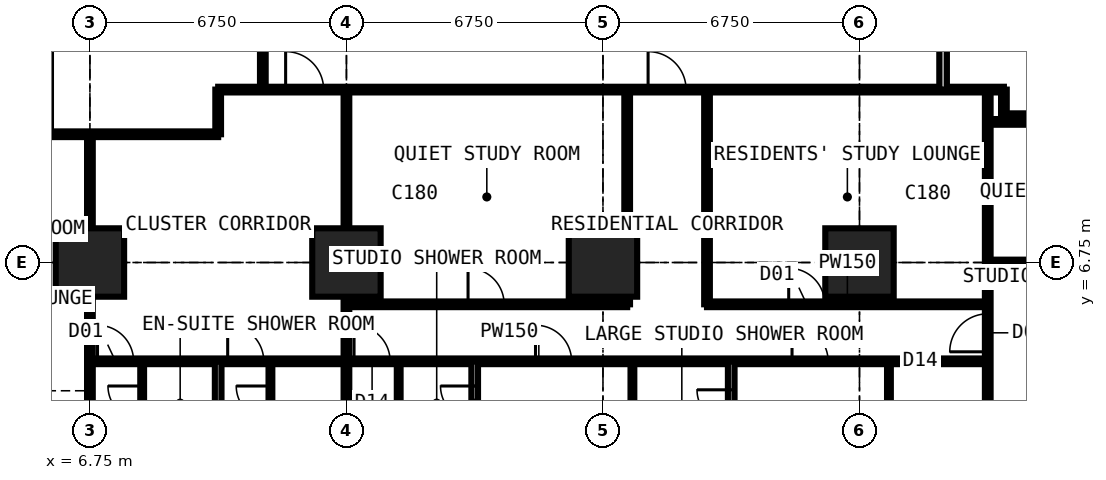
"""IFC4 building model, lengths in metres.
Left out: names, types, materials, properties, quantities, classifications, styles, units other than length and angle.
Written with IfcOpenShell. Run it as: python <this file> out.ifc"""

import sys

from ifc_helpers import new_model, si_unit, direction, frame, frame_2d, origin, origin_2d, place, context, subcontext, project, spatial, rectangle, extrude, element, fill, save


model = new_model("IFC4")
c1 = context("Model", 3, precision=1e-05, world=origin(), true_north=direction((0.0, 1.0)))
c2 = subcontext(c1, "Body", "Model", "MODEL_VIEW")
j1 = project(units=[si_unit("LENGTHUNIT", "METRE"), si_unit("PLANEANGLEUNIT", "RADIAN")], contexts=[c1])
p1 = place(None, origin())
s1 = spatial("IfcSite", under=j1, at=p1, CompositionType="ELEMENT")
p2 = place(p1, origin())
s2 = spatial("IfcBuilding", under=s1, at=p2, CompositionType="ELEMENT")
p3 = place(p2, frame((0.0, 0.0, 54.0)))
s3 = spatial("IfcBuildingStorey", under=s2, at=p3, CompositionType="ELEMENT", Elevation=54.0)
for number, where, z_axis, x_axis in (
    (1, (6.75, 6.75, 0.0), (0.0, 0.0, 1.0), (1.0, 0.0, 0.0)),
    (2, (13.5, 6.75, 0.0), (0.0, 0.0, 1.0), (1.0, 0.0, 0.0)),
    (3, (20.25, 6.75, 0.0), (0.0, 0.0, 1.0), (1.0, 0.0, 0.0)),
    (4, (27.0, 6.75, 0.0), (0.0, 0.0, 1.0), (1.0, 0.0, 0.0)),
):
    element("IfcColumn", number, at=place(p3, frame(where, z_axis=z_axis, x_axis=x_axis)), inside=s3, PredefinedType="COLUMN", context=c2, shape_type="SweptSolid", body=[
        extrude(rectangle(XDim=1.8, YDim=1.8, at=origin_2d()), origin(), (0.0, 0.0, 1.0), 3.6),
    ])
p4 = place(p3, frame((-0.734, 10.125, 0.0), z_axis=(0.0, 0.0, 1.0), x_axis=(1.0, 0.0, 0.0)))
e5 = element("IfcWall", 5, at=p4, inside=s3, PredefinedType="PARTITIONING", context=c2, shape_type="SweptSolid", body=[
    extrude(rectangle(XDim=10.859, YDim=0.15, at=frame_2d((5.429, 0.0))), origin(), (0.0, 0.0, 1.0), 3.375),
])
p5 = place(p4, frame((5.134, 0.0, 0.0)))
e6 = element("IfcOpeningElement", 6, at=p5, cuts=e5, PredefinedType="OPENING", context=c2, shape_type="SweptSolid", body=[
    extrude(rectangle(XDim=1.0, YDim=2.2, at=frame_2d((0.5, 1.1))), frame((0.0, 0.085, 0.0), z_axis=(0.0, -1.0, 0.0), x_axis=(1.0, 0.0, 0.0)), (0.0, 0.0, 1.0), 0.17),
])
p6 = place(p3, frame((6.75, -0.734, 0.0), z_axis=(0.0, 0.0, 1.0), x_axis=(0.0, 1.0, 0.0)))
e7 = element("IfcWall", 7, at=p6, inside=s3, PredefinedType="PARTITIONING", context=c2, shape_type="SweptSolid", body=[
    extrude(rectangle(XDim=10.859, YDim=0.15, at=frame_2d((5.429, 0.0))), origin(), (0.0, 0.0, 1.0), 2.877),
])
p7 = place(p3, frame((6.75, 4.15, 0.0), z_axis=(0.0, 0.0, 1.0), x_axis=(1.0, 0.0, 0.0)))
e8 = element("IfcWall", 8, at=p7, inside=s3, PredefinedType="PARTITIONING", context=c2, shape_type="SweptSolid", body=[
    extrude(rectangle(XDim=23.625, YDim=0.15, at=frame_2d((11.812, 0.0))), origin(), (0.0, 0.0, 1.0), 3.375),
])
p8 = place(p7, frame((0.2, 0.0, 0.0)))
e9 = element("IfcOpeningElement", 9, at=p8, cuts=e8, PredefinedType="OPENING", context=c2, shape_type="SweptSolid", body=[
    extrude(rectangle(XDim=0.95, YDim=2.2, at=frame_2d((0.475, 1.1))), frame((0.0, 0.085, 0.0), z_axis=(0.0, -1.0, 0.0), x_axis=(1.0, 0.0, 0.0)), (0.0, 0.0, 1.0), 0.17),
])
p9 = place(p7, frame((3.625, 0.0, 0.0)))
e10 = element("IfcOpeningElement", 10, at=p9, cuts=e8, PredefinedType="OPENING", context=c2, shape_type="SweptSolid", body=[
    extrude(rectangle(XDim=0.95, YDim=2.2, at=frame_2d((0.475, 1.1))), frame((0.0, 0.085, 0.0), z_axis=(0.0, -1.0, 0.0), x_axis=(1.0, 0.0, 0.0)), (0.0, 0.0, 1.0), 0.17),
])
p10 = place(p7, frame((18.475, 0.0, 0.0)))
e11 = element("IfcOpeningElement", 11, at=p10, cuts=e8, PredefinedType="OPENING", context=c2, shape_type="SweptSolid", body=[
    extrude(rectangle(XDim=0.95, YDim=2.2, at=frame_2d((0.475, 1.1))), frame((0.0, 0.085, 0.0), z_axis=(0.0, -1.0, 0.0), x_axis=(1.0, 0.0, 0.0)), (0.0, 0.0, 1.0), 0.17),
])
p11 = place(p7, frame((11.725, 0.0, 0.0)))
e12 = element("IfcOpeningElement", 12, at=p11, cuts=e8, PredefinedType="OPENING", context=c2, shape_type="SweptSolid", body=[
    extrude(rectangle(XDim=0.95, YDim=2.2, at=frame_2d((0.475, 1.1))), frame((0.0, 0.085, 0.0), z_axis=(0.0, -1.0, 0.0), x_axis=(1.0, 0.0, 0.0)), (0.0, 0.0, 1.0), 0.17),
])
p12 = place(p7, frame((6.95, 0.0, 0.0)))
e13 = element("IfcOpeningElement", 13, at=p12, cuts=e8, PredefinedType="OPENING", context=c2, shape_type="SweptSolid", body=[
    extrude(rectangle(XDim=0.95, YDim=2.2, at=frame_2d((0.475, 1.1))), frame((0.0, 0.085, 0.0), z_axis=(0.0, -1.0, 0.0), x_axis=(1.0, 0.0, 0.0)), (0.0, 0.0, 1.0), 0.17),
])
p13 = place(p3, frame((8.125, 1.95, 0.0), z_axis=(0.0, 0.0, 1.0), x_axis=(0.0, 1.0, 0.0)))
e14 = element("IfcWall", 14, at=p13, inside=s3, PredefinedType="PARTITIONING", context=c2, shape_type="SweptSolid", body=[
    extrude(rectangle(XDim=2.2, YDim=0.1, at=frame_2d((1.1, 0.0))), origin(), (0.0, 0.0, 1.0), 3.375),
])
p14 = place(p13, frame((0.65, 0.0, 0.0)))
e15 = element("IfcOpeningElement", 15, at=p14, cuts=e14, PredefinedType="OPENING", context=c2, shape_type="SweptSolid", body=[
    extrude(rectangle(XDim=0.9, YDim=2.2, at=frame_2d((0.45, 1.1))), frame((0.0, 0.06, 0.0), z_axis=(0.0, -1.0, 0.0), x_axis=(1.0, 0.0, 0.0)), (0.0, 0.0, 1.0), 0.12),
])
p15 = place(p3, frame((10.125, -0.734, 0.0), z_axis=(0.0, 0.0, 1.0), x_axis=(0.0, 1.0, 0.0)))
e16 = element("IfcWall", 16, at=p15, inside=s3, PredefinedType="PARTITIONING", context=c2, shape_type="SweptSolid", body=[
    extrude(rectangle(XDim=4.884, YDim=0.175, at=frame_2d((2.442, 0.0))), origin(), (0.0, 0.0, 1.0), 3.375),
])
p16 = place(p3, frame((10.125, 10.125, 0.0), z_axis=(0.0, 0.0, 1.0), x_axis=(0.0, 1.0, 0.0)))
e17 = element("IfcWall", 17, at=p16, inside=s3, PredefinedType="PARTITIONING", context=c2, shape_type="SweptSolid", body=[
    extrude(rectangle(XDim=1.175, YDim=0.15, at=frame_2d((0.587, 0.0))), origin(), (0.0, 0.0, 1.0), 3.375),
])
p17 = place(p3, frame((10.125, 11.3, 0.0), z_axis=(0.0, 0.0, 1.0), x_axis=(1.0, 0.0, 0.0)))
e18 = element("IfcWall", 18, at=p17, inside=s3, PredefinedType="PARTITIONING", context=c2, shape_type="SweptSolid", body=[
    extrude(rectangle(XDim=20.675, YDim=0.15, at=frame_2d((10.337, 0.0))), origin(), (0.0, 0.0, 1.0), 3.375),
])
p18 = place(p17, frame((1.775, 0.0, 0.0)))
e19 = element("IfcOpeningElement", 19, at=p18, cuts=e18, PredefinedType="OPENING", context=c2, shape_type="SweptSolid", body=[
    extrude(rectangle(XDim=1.0, YDim=2.2, at=frame_2d((0.5, 1.1))), frame((0.0, 0.085, 0.0), z_axis=(0.0, -1.0, 0.0), x_axis=(1.0, 0.0, 0.0)), (0.0, 0.0, 1.0), 0.17),
])
p19 = place(p17, frame((11.312, 0.0, 0.0)))
e20 = element("IfcOpeningElement", 20, at=p19, cuts=e18, PredefinedType="OPENING", context=c2, shape_type="SweptSolid", body=[
    extrude(rectangle(XDim=1.0, YDim=2.2, at=frame_2d((0.5, 1.1))), frame((0.0, 0.085, 0.0), z_axis=(0.0, -1.0, 0.0), x_axis=(1.0, 0.0, 0.0)), (0.0, 0.0, 1.0), 0.17),
])
p20 = place(p3, frame((11.3, 11.3, 0.0), z_axis=(0.0, 0.0, 1.0), x_axis=(0.0, 1.0, 0.0)))
e21 = element("IfcWall", 21, at=p20, inside=s3, PredefinedType="PARTITIONING", context=c2, shape_type="SweptSolid", body=[
    extrude(rectangle(XDim=19.075, YDim=0.15, at=frame_2d((9.538, 0.0))), origin(), (0.0, 0.0, 1.0), 3.375),
])
p21 = place(p20, frame((10.137, 0.0, 0.0)))
e22 = element("IfcOpeningElement", 22, at=p21, cuts=e21, PredefinedType="OPENING", context=c2, shape_type="SweptSolid", body=[
    extrude(rectangle(XDim=1.0, YDim=2.2, at=frame_2d((0.5, 1.1))), frame((0.0, 0.085, 0.0), z_axis=(0.0, -1.0, 0.0), x_axis=(1.0, 0.0, 0.0)), (0.0, 0.0, 1.0), 0.17),
])
p22 = place(p3, frame((11.5, 1.95, 0.0), z_axis=(0.0, 0.0, 1.0), x_axis=(0.0, 1.0, 0.0)))
e23 = element("IfcWall", 23, at=p22, inside=s3, PredefinedType="PARTITIONING", context=c2, shape_type="SweptSolid", body=[
    extrude(rectangle(XDim=2.2, YDim=0.1, at=frame_2d((1.1, 0.0))), origin(), (0.0, 0.0, 1.0), 3.375),
])
p23 = place(p22, frame((0.65, 0.0, 0.0)))
e24 = element("IfcOpeningElement", 24, at=p23, cuts=e23, PredefinedType="OPENING", context=c2, shape_type="SweptSolid", body=[
    extrude(rectangle(XDim=0.9, YDim=2.2, at=frame_2d((0.45, 1.1))), frame((0.0, 0.06, 0.0), z_axis=(0.0, -1.0, 0.0), x_axis=(1.0, 0.0, 0.0)), (0.0, 0.0, 1.0), 0.12),
])
p24 = place(p3, frame((13.5, -0.734, 0.0), z_axis=(0.0, 0.0, 1.0), x_axis=(0.0, 1.0, 0.0)))
e25 = element("IfcWall", 25, at=p24, inside=s3, PredefinedType="PARTITIONING", context=c2, shape_type="SweptSolid", body=[
    extrude(rectangle(XDim=12.034, YDim=0.15, at=frame_2d((6.017, 0.0))), origin(), (0.0, 0.0, 1.0), 2.877),
])
p25 = place(p3, frame((13.5, 5.65, 0.0), z_axis=(0.0, 0.0, 1.0), x_axis=(1.0, 0.0, 0.0)))
e26 = element("IfcWall", 26, at=p25, inside=s3, PredefinedType="PARTITIONING", context=c2, shape_type="SweptSolid", body=[
    extrude(rectangle(XDim=7.387, YDim=0.15, at=frame_2d((3.694, 0.0))), origin(), (0.0, 0.0, 1.0), 3.375),
])
p26 = place(p25, frame((3.2, 0.0, 0.0)))
e27 = element("IfcOpeningElement", 27, at=p26, cuts=e26, PredefinedType="OPENING", context=c2, shape_type="SweptSolid", body=[
    extrude(rectangle(XDim=0.95, YDim=2.2, at=frame_2d((0.475, 1.1))), frame((0.0, 0.085, 0.0), z_axis=(0.0, -1.0, 0.0), x_axis=(1.0, 0.0, 0.0)), (0.0, 0.0, 1.0), 0.17),
])
p27 = place(p3, frame((14.875, 1.95, 0.0), z_axis=(0.0, 0.0, 1.0), x_axis=(0.0, 1.0, 0.0)))
e28 = element("IfcWall", 28, at=p27, inside=s3, PredefinedType="PARTITIONING", context=c2, shape_type="SweptSolid", body=[
    extrude(rectangle(XDim=2.2, YDim=0.1, at=frame_2d((1.1, 0.0))), origin(), (0.0, 0.0, 1.0), 3.375),
])
p28 = place(p3, frame((16.875, -0.734, 0.0), z_axis=(0.0, 0.0, 1.0), x_axis=(0.0, 1.0, 0.0)))
e29 = element("IfcWall", 29, at=p28, inside=s3, PredefinedType="PARTITIONING", context=c2, shape_type="SweptSolid", body=[
    extrude(rectangle(XDim=4.884, YDim=0.175, at=frame_2d((2.442, 0.0))), origin(), (0.0, 0.0, 1.0), 3.375),
])
p29 = place(p28, frame((3.334, 0.0, 0.0)))
e30 = element("IfcOpeningElement", 30, at=p29, cuts=e29, PredefinedType="OPENING", context=c2, shape_type="SweptSolid", body=[
    extrude(rectangle(XDim=0.9, YDim=2.2, at=frame_2d((0.45, 1.1))), frame((0.0, 0.097, 0.0), z_axis=(0.0, -1.0, 0.0), x_axis=(1.0, 0.0, 0.0)), (0.0, 0.0, 1.0), 0.195),
])
p30 = place(p3, frame((20.887, 5.65, 0.0), z_axis=(0.0, 0.0, 1.0), x_axis=(0.0, 1.0, 0.0)))
e31 = element("IfcWall", 31, at=p30, inside=s3, PredefinedType="PARTITIONING", context=c2, shape_type="SweptSolid", body=[
    extrude(rectangle(XDim=5.65, YDim=0.15, at=frame_2d((2.825, 0.0))), origin(), (0.0, 0.0, 1.0), 3.375),
])
p31 = place(p3, frame((21.025, 1.75, 0.0), z_axis=(0.0, 0.0, 1.0), x_axis=(0.0, 1.0, 0.0)))
e32 = element("IfcWall", 32, at=p31, inside=s3, PredefinedType="PARTITIONING", context=c2, shape_type="SweptSolid", body=[
    extrude(rectangle(XDim=2.4, YDim=0.1, at=frame_2d((1.2, 0.0))), origin(), (0.0, 0.0, 1.0), 3.375),
])
p32 = place(p3, frame((22.988, 5.65, 0.0), z_axis=(0.0, 0.0, 1.0), x_axis=(1.0, 0.0, 0.0)))
e33 = element("IfcWall", 33, at=p32, inside=s3, PredefinedType="PARTITIONING", context=c2, shape_type="SweptSolid", body=[
    extrude(rectangle(XDim=7.387, YDim=0.15, at=frame_2d((3.694, 0.0))), origin(), (0.0, 0.0, 1.0), 3.375),
])
p33 = place(p32, frame((2.15, 0.0, 0.0)))
e34 = element("IfcOpeningElement", 34, at=p33, cuts=e33, PredefinedType="OPENING", context=c2, shape_type="SweptSolid", body=[
    extrude(rectangle(XDim=0.95, YDim=2.2, at=frame_2d((0.475, 1.1))), frame((0.0, 0.085, 0.0), z_axis=(0.0, -1.0, 0.0), x_axis=(1.0, 0.0, 0.0)), (0.0, 0.0, 1.0), 0.17),
])
p34 = place(p3, frame((22.988, 5.65, 0.0), z_axis=(0.0, 0.0, 1.0), x_axis=(0.0, 1.0, 0.0)))
e35 = element("IfcWall", 35, at=p34, inside=s3, PredefinedType="PARTITIONING", context=c2, shape_type="SweptSolid", body=[
    extrude(rectangle(XDim=5.65, YDim=0.15, at=frame_2d((2.825, 0.0))), origin(), (0.0, 0.0, 1.0), 3.375),
])
p35 = place(p3, frame((23.625, -0.734, 0.0), z_axis=(0.0, 0.0, 1.0), x_axis=(0.0, 1.0, 0.0)))
e36 = element("IfcWall", 36, at=p35, inside=s3, PredefinedType="PARTITIONING", context=c2, shape_type="SweptSolid", body=[
    extrude(rectangle(XDim=4.884, YDim=0.175, at=frame_2d((2.442, 0.0))), origin(), (0.0, 0.0, 1.0), 3.375),
])
p36 = place(p35, frame((3.234, 0.0, 0.0)))
e37 = element("IfcOpeningElement", 37, at=p36, cuts=e36, PredefinedType="OPENING", context=c2, shape_type="SweptSolid", body=[
    extrude(rectangle(XDim=0.9, YDim=2.2, at=frame_2d((0.45, 1.1))), frame((0.0, 0.097, 0.0), z_axis=(0.0, -1.0, 0.0), x_axis=(1.0, 0.0, 0.0)), (0.0, 0.0, 1.0), 0.195),
])
p37 = place(p3, frame((27.775, 1.75, 0.0), z_axis=(0.0, 0.0, 1.0), x_axis=(0.0, 1.0, 0.0)))
e38 = element("IfcWall", 38, at=p37, inside=s3, PredefinedType="PARTITIONING", context=c2, shape_type="SweptSolid", body=[
    extrude(rectangle(XDim=2.4, YDim=0.1, at=frame_2d((1.2, 0.0))), origin(), (0.0, 0.0, 1.0), 3.375),
])
p38 = place(p3, frame((29.2, 11.3, 0.0), z_axis=(0.0, 0.0, 1.0), x_axis=(0.0, 1.0, 0.0)))
e39 = element("IfcWall", 39, at=p38, inside=s3, PredefinedType="PARTITIONING", context=c2, shape_type="SweptSolid", body=[
    extrude(rectangle(XDim=17.9, YDim=0.2, at=frame_2d((8.95, 0.0))), origin(), (0.0, 0.0, 1.0), 3.375),
])
p39 = place(p38, frame((8.35, 0.0, 0.0)))
e40 = element("IfcOpeningElement", 40, at=p39, cuts=e39, PredefinedType="OPENING", context=c2, shape_type="SweptSolid", body=[
    extrude(rectangle(XDim=1.2, YDim=2.2, at=frame_2d((0.6, 1.1))), frame((0.0, 0.11, 0.0), z_axis=(0.0, -1.0, 0.0), x_axis=(1.0, 0.0, 0.0)), (0.0, 0.0, 1.0), 0.22),
])
p40 = place(p3, frame((30.375, -0.734, 0.0), z_axis=(0.0, 0.0, 1.0), x_axis=(0.0, 1.0, 0.0)))
e41 = element("IfcWall", 41, at=p40, inside=s3, PredefinedType="PARTITIONING", context=c2, shape_type="SweptSolid", body=[
    extrude(rectangle(XDim=12.034, YDim=0.15, at=frame_2d((6.017, 0.0))), origin(), (0.0, 0.0, 1.0), 3.375),
])
p41 = place(p40, frame((5.134, 0.0, 0.0)))
e42 = element("IfcOpeningElement", 42, at=p41, cuts=e41, PredefinedType="OPENING", context=c2, shape_type="SweptSolid", body=[
    extrude(rectangle(XDim=1.0, YDim=2.2, at=frame_2d((0.5, 1.1))), frame((0.0, 0.085, 0.0), z_axis=(0.0, -1.0, 0.0), x_axis=(1.0, 0.0, 0.0)), (0.0, 0.0, 1.0), 0.17),
])
p42 = place(p3, frame((30.375, 6.75, 0.0), z_axis=(0.0, 0.0, 1.0), x_axis=(1.0, 0.0, 0.0)))
e43 = element("IfcWall", 43, at=p42, inside=s3, PredefinedType="PARTITIONING", context=c2, shape_type="SweptSolid", body=[
    extrude(rectangle(XDim=5.975, YDim=0.15, at=frame_2d((2.988, 0.0))), origin(), (0.0, 0.0, 1.0), 2.877),
])
p43 = place(p3, frame((30.375, 10.45, 0.0), z_axis=(0.0, 0.0, 1.0), x_axis=(1.0, 0.0, 0.0)))
e44 = element("IfcWall", 44, at=p43, inside=s3, PredefinedType="PARTITIONING", context=c2, shape_type="SweptSolid", body=[
    extrude(rectangle(XDim=4.475, YDim=0.15, at=frame_2d((2.238, 0.0))), origin(), (0.0, 0.0, 1.0), 3.375),
])
p44 = place(p43, frame((2.35, 0.0, 0.0)))
e45 = element("IfcOpeningElement", 45, at=p44, cuts=e44, PredefinedType="OPENING", context=c2, shape_type="SweptSolid", body=[
    extrude(rectangle(XDim=0.95, YDim=2.2, at=frame_2d((0.475, 1.1))), frame((0.0, 0.085, 0.0), z_axis=(0.0, -1.0, 0.0), x_axis=(1.0, 0.0, 0.0)), (0.0, 0.0, 1.0), 0.17),
])
p45 = place(p3, frame((30.8, 10.6, 0.0), z_axis=(0.0, 0.0, 1.0), x_axis=(0.0, 1.0, 0.0)))
e46 = element("IfcWall", 46, at=p45, inside=s3, PredefinedType="PARTITIONING", context=c2, shape_type="SweptSolid", body=[
    extrude(rectangle(XDim=0.7, YDim=0.15, at=frame_2d((0.35, 0.0))), origin(), (0.0, 0.0, 1.0), 3.375),
])
p46 = place(p3, frame((30.8, 10.6, 0.0), z_axis=(0.0, 0.0, 1.0), x_axis=(1.0, 0.0, 0.0)))
e47 = element("IfcWall", 47, at=p46, inside=s3, PredefinedType="PARTITIONING", context=c2, shape_type="SweptSolid", body=[
    extrude(rectangle(XDim=1.85, YDim=0.15, at=frame_2d((0.925, 0.0))), origin(), (0.0, 0.0, 1.0), 3.375),
])
p47 = place(p8, origin())
e48 = element("IfcDoor", 48, at=p47, inside=s3, OperationType="SINGLE_SWING_LEFT", PredefinedType="DOOR", context=c2, shape_type="SweptSolid", body=[
    extrude(rectangle(XDim=0.95, YDim=2.2, at=frame_2d((0.475, 1.1))), frame((0.0, 0.025, 0.0), z_axis=(0.0, -1.0, 0.0), x_axis=(1.0, 0.0, 0.0)), (0.0, 0.0, 1.0), 0.05),
])
fill(e9, e48)
p48 = place(p14, origin())
e49 = element("IfcDoor", 49, at=p48, inside=s3, OperationType="SINGLE_SWING_RIGHT", PredefinedType="DOOR", context=c2, shape_type="SweptSolid", body=[
    extrude(rectangle(XDim=0.9, YDim=2.2, at=frame_2d((0.45, 1.1))), frame((0.0, 0.025, 0.0), z_axis=(0.0, -1.0, 0.0), x_axis=(1.0, 0.0, 0.0)), (0.0, 0.0, 1.0), 0.05),
])
fill(e15, e49)
p49 = place(p9, origin())
e50 = element("IfcDoor", 50, at=p49, inside=s3, OperationType="SINGLE_SWING_LEFT", PredefinedType="DOOR", context=c2, shape_type="SweptSolid", body=[
    extrude(rectangle(XDim=0.95, YDim=2.2, at=frame_2d((0.475, 1.1))), frame((0.0, 0.025, 0.0), z_axis=(0.0, -1.0, 0.0), x_axis=(1.0, 0.0, 0.0)), (0.0, 0.0, 1.0), 0.05),
])
fill(e10, e50)
p50 = place(p23, origin())
e51 = element("IfcDoor", 51, at=p50, inside=s3, OperationType="SINGLE_SWING_RIGHT", PredefinedType="DOOR", context=c2, shape_type="SweptSolid", body=[
    extrude(rectangle(XDim=0.9, YDim=2.2, at=frame_2d((0.45, 1.1))), frame((0.0, 0.025, 0.0), z_axis=(0.0, -1.0, 0.0), x_axis=(1.0, 0.0, 0.0)), (0.0, 0.0, 1.0), 0.05),
])
fill(e24, e51)
p51 = place(p18, origin())
e52 = element("IfcDoor", 52, at=p51, inside=s3, OperationType="SINGLE_SWING_LEFT", PredefinedType="DOOR", context=c2, shape_type="SweptSolid", body=[
    extrude(rectangle(XDim=1.0, YDim=2.2, at=frame_2d((0.5, 1.1))), frame((0.0, 0.025, 0.0), z_axis=(0.0, -1.0, 0.0), x_axis=(1.0, 0.0, 0.0)), (0.0, 0.0, 1.0), 0.05),
])
fill(e19, e52)
p52 = place(p10, origin())
e53 = element("IfcDoor", 53, at=p52, inside=s3, OperationType="SINGLE_SWING_LEFT", PredefinedType="DOOR", context=c2, shape_type="SweptSolid", body=[
    extrude(rectangle(XDim=0.95, YDim=2.2, at=frame_2d((0.475, 1.1))), frame((0.0, 0.025, 0.0), z_axis=(0.0, -1.0, 0.0), x_axis=(1.0, 0.0, 0.0)), (0.0, 0.0, 1.0), 0.05),
])
fill(e11, e53)
p53 = place(p11, origin())
e54 = element("IfcDoor", 54, at=p53, inside=s3, OperationType="SINGLE_SWING_LEFT", PredefinedType="DOOR", context=c2, shape_type="SweptSolid", body=[
    extrude(rectangle(XDim=0.95, YDim=2.2, at=frame_2d((0.475, 1.1))), frame((0.0, 0.025, 0.0), z_axis=(0.0, -1.0, 0.0), x_axis=(1.0, 0.0, 0.0)), (0.0, 0.0, 1.0), 0.05),
])
fill(e12, e54)
p54 = place(p36, origin())
e55 = element("IfcDoor", 55, at=p54, inside=s3, OperationType="SINGLE_SWING_RIGHT", PredefinedType="DOOR", context=c2, shape_type="SweptSolid", body=[
    extrude(rectangle(XDim=0.9, YDim=2.2, at=frame_2d((0.45, 1.1))), frame((0.0, 0.025, 0.0), z_axis=(0.0, -1.0, 0.0), x_axis=(1.0, 0.0, 0.0)), (0.0, 0.0, 1.0), 0.05),
])
fill(e37, e55)
p55 = place(p12, origin())
e56 = element("IfcDoor", 56, at=p55, inside=s3, OperationType="SINGLE_SWING_LEFT", PredefinedType="DOOR", context=c2, shape_type="SweptSolid", body=[
    extrude(rectangle(XDim=0.95, YDim=2.2, at=frame_2d((0.475, 1.1))), frame((0.0, 0.025, 0.0), z_axis=(0.0, -1.0, 0.0), x_axis=(1.0, 0.0, 0.0)), (0.0, 0.0, 1.0), 0.05),
])
fill(e13, e56)
p56 = place(p29, origin())
e57 = element("IfcDoor", 57, at=p56, inside=s3, OperationType="SINGLE_SWING_RIGHT", PredefinedType="DOOR", context=c2, shape_type="SweptSolid", body=[
    extrude(rectangle(XDim=0.9, YDim=2.2, at=frame_2d((0.45, 1.1))), frame((0.0, 0.025, 0.0), z_axis=(0.0, -1.0, 0.0), x_axis=(1.0, 0.0, 0.0)), (0.0, 0.0, 1.0), 0.05),
])
fill(e30, e57)
p57 = place(p19, origin())
e58 = element("IfcDoor", 58, at=p57, inside=s3, OperationType="SINGLE_SWING_LEFT", PredefinedType="DOOR", context=c2, shape_type="SweptSolid", body=[
    extrude(rectangle(XDim=1.0, YDim=2.2, at=frame_2d((0.5, 1.1))), frame((0.0, 0.025, 0.0), z_axis=(0.0, -1.0, 0.0), x_axis=(1.0, 0.0, 0.0)), (0.0, 0.0, 1.0), 0.05),
])
fill(e20, e58)
p58 = place(p33, origin())
e59 = element("IfcDoor", 59, at=p58, inside=s3, OperationType="SINGLE_SWING_LEFT", PredefinedType="DOOR", context=c2, shape_type="SweptSolid", body=[
    extrude(rectangle(XDim=0.95, YDim=2.2, at=frame_2d((0.475, 1.1))), frame((0.0, 0.025, 0.0), z_axis=(0.0, -1.0, 0.0), x_axis=(1.0, 0.0, 0.0)), (0.0, 0.0, 1.0), 0.05),
])
fill(e34, e59)
p59 = place(p26, origin())
e60 = element("IfcDoor", 60, at=p59, inside=s3, OperationType="SINGLE_SWING_LEFT", PredefinedType="DOOR", context=c2, shape_type="SweptSolid", body=[
    extrude(rectangle(XDim=0.95, YDim=2.2, at=frame_2d((0.475, 1.1))), frame((0.0, 0.025, 0.0), z_axis=(0.0, -1.0, 0.0), x_axis=(1.0, 0.0, 0.0)), (0.0, 0.0, 1.0), 0.05),
])
fill(e27, e60)
p60 = place(p41, origin())
e61 = element("IfcDoor", 61, at=p60, inside=s3, OperationType="SINGLE_SWING_LEFT", PredefinedType="DOOR", context=c2, shape_type="SweptSolid", body=[
    extrude(rectangle(XDim=1.0, YDim=2.2, at=frame_2d((0.5, 1.1))), frame((0.0, 0.025, 0.0), z_axis=(0.0, -1.0, 0.0), x_axis=(1.0, 0.0, 0.0)), (0.0, 0.0, 1.0), 0.05),
])
fill(e42, e61)
save(model, sys.argv[1])
